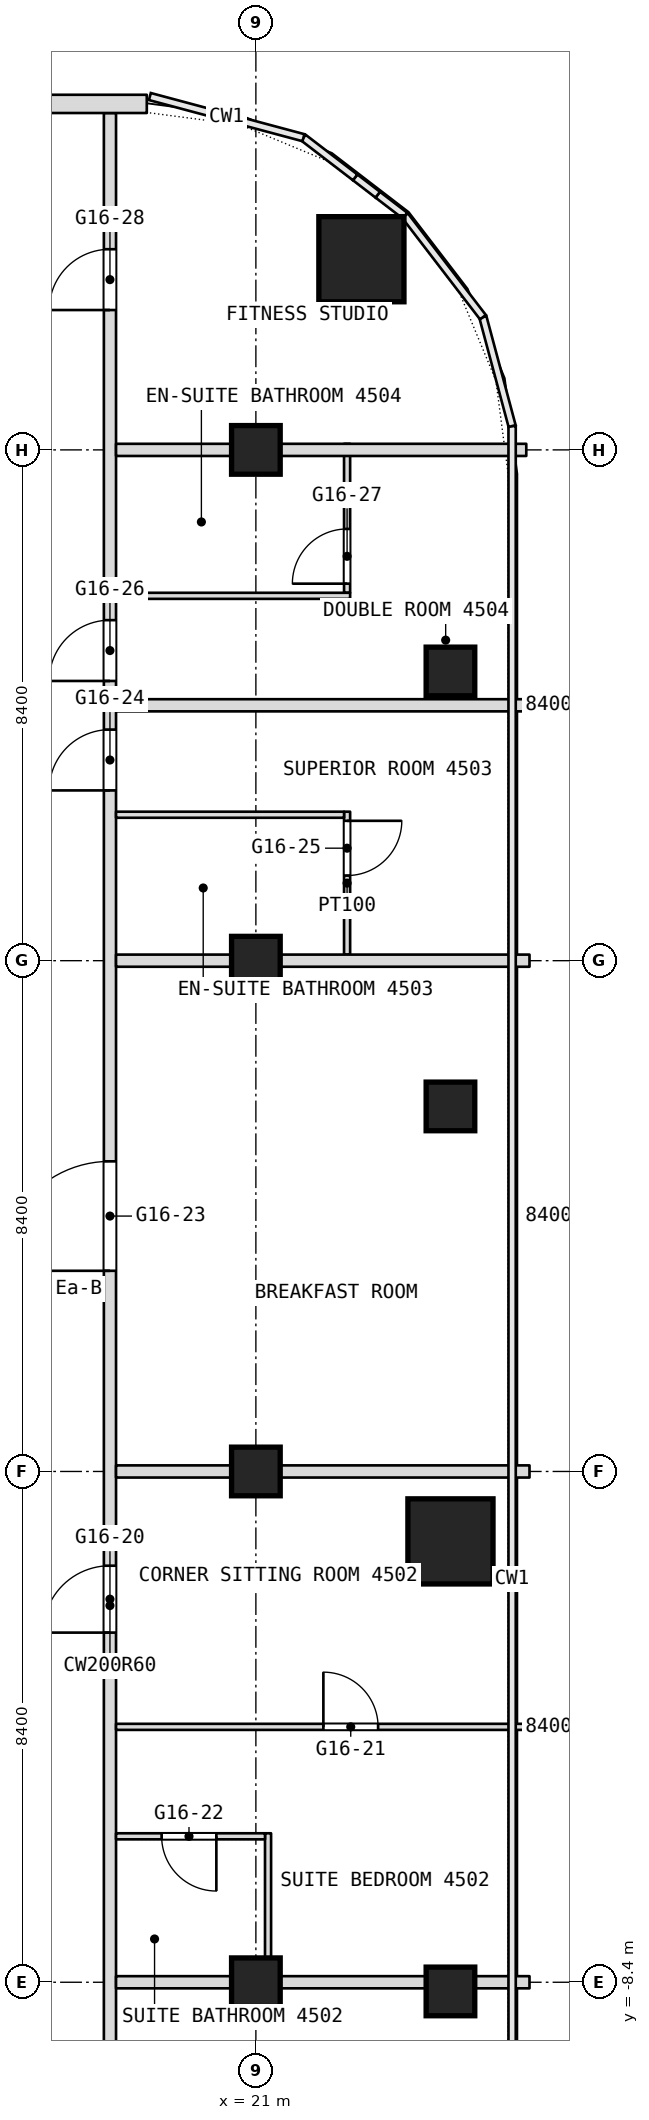
"""IFC4 building model, lengths in metres.
Left out: names, types, materials, properties, quantities, classifications, styles, units other than length and angle.
Written with IfcOpenShell. Run it as: python <this file> out.ifc"""

import sys

from ifc_helpers import new_model, si_unit, direction, frame, frame_2d, origin, origin_2d, place, context, subcontext, project, spatial, rectangle, extrude, element, fill, save


model = new_model("IFC4")
c1 = context("Model", 3, precision=1e-05, world=origin(), true_north=direction((0.0, 1.0)))
c2 = subcontext(c1, "Body", "Model", "MODEL_VIEW")
j1 = project(units=[si_unit("LENGTHUNIT", "METRE"), si_unit("PLANEANGLEUNIT", "RADIAN")], contexts=[c1])
p1 = place(None, origin())
s1 = spatial("IfcSite", under=j1, at=p1, CompositionType="ELEMENT")
p2 = place(p1, origin())
s2 = spatial("IfcBuilding", under=s1, at=p2, CompositionType="ELEMENT")
p3 = place(p2, frame((0.0, 0.0, 198.5)))
s3 = spatial("IfcBuildingStorey", under=s2, at=p3, CompositionType="ELEMENT", Elevation=198.5)
for number, where, z_axis, x_axis in (
    (1, (24.2, -1.15, 0.0), (0.0, 0.0, 1.0), (1.0, 0.0, 0.0)),
    (2, (22.736, 19.936, 0.0), (0.0, 0.0, 1.0), (1.0, 0.0, 0.0)),
):
    element("IfcColumn", number, at=place(p3, frame(where, z_axis=z_axis, x_axis=x_axis)), inside=s3, PredefinedType="COLUMN", context=c2, shape_type="SweptSolid", body=[
        extrude(rectangle(XDim=1.4, YDim=1.4, at=origin_2d()), origin(), (0.0, 0.0, 1.0), 3.6),
    ])
for number, where, z_axis, x_axis in (
    (3, (21.0, -8.4, 0.0), (0.0, 0.0, 1.0), (1.0, 0.0, 0.0)),
    (4, (21.0, 0.0, 0.0), (0.0, 0.0, 1.0), (1.0, 0.0, 0.0)),
    (5, (21.0, 8.4, 0.0), (0.0, 0.0, 1.0), (1.0, 0.0, 0.0)),
    (6, (21.0, 16.8, 0.0), (0.0, 0.0, 1.0), (1.0, 0.0, 0.0)),
    (7, (24.2, 13.156, 0.0), (0.0, 0.0, 1.0), (1.0, 0.0, 0.0)),
    (8, (24.2, 6.003, 0.0), (0.0, 0.0, 1.0), (1.0, 0.0, 0.0)),
    (9, (24.2, -8.551, 0.0), (0.0, 0.0, 1.0), (1.0, 0.0, 0.0)),
):
    element("IfcColumn", number, at=place(p3, frame(where, z_axis=z_axis, x_axis=x_axis)), inside=s3, PredefinedType="COLUMN", context=c2, shape_type="SweptSolid", body=[
        extrude(rectangle(XDim=0.8, YDim=0.8, at=origin_2d()), origin(), (0.0, 0.0, 1.0), 3.6),
    ])
p4 = place(p3, frame((22.5, 8.5, 0.0), z_axis=(0.0, 0.0, 1.0), x_axis=(0.0, 1.0, 0.0)))
e10 = element("IfcWall", 10, at=p4, inside=s3, PredefinedType="PARTITIONING", context=c2, shape_type="SweptSolid", body=[
    extrude(rectangle(XDim=2.35, YDim=0.1, at=frame_2d((1.175, 0.0))), origin(), (0.0, 0.0, 1.0), 3.34),
])
p5 = place(p4, frame((1.3, 0.0, 0.0)))
e11 = element("IfcOpeningElement", 11, at=p5, cuts=e10, PredefinedType="OPENING", context=c2, shape_type="SweptSolid", body=[
    extrude(rectangle(XDim=0.9, YDim=2.1, at=frame_2d((0.45, 1.05))), frame((0.0, 0.05, 0.0), z_axis=(0.0, -1.0, 0.0), x_axis=(1.0, 0.0, 0.0)), (0.0, 0.0, 1.0), 0.1),
])
p6 = place(p3, frame((22.5, 14.45, 0.0), z_axis=(0.0, 0.0, 1.0), x_axis=(0.0, 1.0, 0.0)))
e12 = element("IfcWall", 12, at=p6, inside=s3, PredefinedType="PARTITIONING", context=c2, shape_type="SweptSolid", body=[
    extrude(rectangle(XDim=2.45, YDim=0.1, at=frame_2d((1.225, 0.0))), origin(), (0.0, 0.0, 1.0), 3.34),
])
p7 = place(p6, frame((0.15, 0.0, 0.0)))
e13 = element("IfcOpeningElement", 13, at=p7, cuts=e12, PredefinedType="OPENING", context=c2, shape_type="SweptSolid", body=[
    extrude(rectangle(XDim=0.9, YDim=2.1, at=frame_2d((0.45, 1.05))), frame((0.0, 0.05, 0.0), z_axis=(0.0, -1.0, 0.0), x_axis=(1.0, 0.0, 0.0)), (0.0, 0.0, 1.0), 0.1),
])
p8 = place(p3, frame((21.2, -8.3, 0.0), z_axis=(0.0, 0.0, 1.0), x_axis=(0.0, 1.0, 0.0)))
e14 = element("IfcWall", 14, at=p8, inside=s3, PredefinedType="PARTITIONING", context=c2, shape_type="SweptSolid", body=[
    extrude(rectangle(XDim=2.35, YDim=0.1, at=frame_2d((1.175, 0.0))), origin(), (0.0, 0.0, 1.0), 3.34),
])
p9 = place(p3, frame((18.6, -26.751, 0.0), z_axis=(0.0, 0.0, 1.0), x_axis=(0.0, 1.0, 0.0)))
e15 = element("IfcWall", 15, at=p9, inside=s3, PredefinedType="PARTITIONING", context=c2, shape_type="SweptSolid", body=[
    extrude(rectangle(XDim=49.091, YDim=0.2, at=frame_2d((24.545, 0.0))), origin(), (0.0, 0.0, 1.0), 3.34),
])
p10 = place(p9, frame((4.576, 0.0, 0.0)))
e16 = element("IfcOpeningElement", 16, at=p10, cuts=e15, PredefinedType="OPENING", context=c2, shape_type="SweptSolid", body=[
    extrude(rectangle(XDim=1.1, YDim=2.1, at=frame_2d((0.55, 1.05))), frame((0.0, 0.1, 0.0), z_axis=(0.0, -1.0, 0.0), x_axis=(1.0, 0.0, 0.0)), (0.0, 0.0, 1.0), 0.2),
])
p11 = place(p9, frame((13.251, 0.0, 0.0)))
e17 = element("IfcOpeningElement", 17, at=p11, cuts=e15, PredefinedType="OPENING", context=c2, shape_type="SweptSolid", body=[
    extrude(rectangle(XDim=1.8, YDim=2.1, at=frame_2d((0.9, 1.05))), frame((0.0, 0.1, 0.0), z_axis=(0.0, -1.0, 0.0), x_axis=(1.0, 0.0, 0.0)), (0.0, 0.0, 1.0), 0.2),
])
p12 = place(p9, frame((24.101, 0.0, 0.0)))
e18 = element("IfcOpeningElement", 18, at=p12, cuts=e15, PredefinedType="OPENING", context=c2, shape_type="SweptSolid", body=[
    extrude(rectangle(XDim=1.1, YDim=2.1, at=frame_2d((0.55, 1.05))), frame((0.0, 0.1, 0.0), z_axis=(0.0, -1.0, 0.0), x_axis=(1.0, 0.0, 0.0)), (0.0, 0.0, 1.0), 0.2),
])
p13 = place(p9, frame((30.051, 0.0, 0.0)))
e19 = element("IfcOpeningElement", 19, at=p13, cuts=e15, PredefinedType="OPENING", context=c2, shape_type="SweptSolid", body=[
    extrude(rectangle(XDim=1.8, YDim=2.1, at=frame_2d((0.9, 1.05))), frame((0.0, 0.1, 0.0), z_axis=(0.0, -1.0, 0.0), x_axis=(1.0, 0.0, 0.0)), (0.0, 0.0, 1.0), 0.2),
])
p14 = place(p9, frame((37.951, 0.0, 0.0)))
e20 = element("IfcOpeningElement", 20, at=p14, cuts=e15, PredefinedType="OPENING", context=c2, shape_type="SweptSolid", body=[
    extrude(rectangle(XDim=1.0, YDim=2.1, at=frame_2d((0.5, 1.05))), frame((0.0, 0.1, 0.0), z_axis=(0.0, -1.0, 0.0), x_axis=(1.0, 0.0, 0.0)), (0.0, 0.0, 1.0), 0.2),
])
p15 = place(p9, frame((39.751, 0.0, 0.0)))
e21 = element("IfcOpeningElement", 21, at=p15, cuts=e15, PredefinedType="OPENING", context=c2, shape_type="SweptSolid", body=[
    extrude(rectangle(XDim=1.0, YDim=2.1, at=frame_2d((0.5, 1.05))), frame((0.0, 0.1, 0.0), z_axis=(0.0, -1.0, 0.0), x_axis=(1.0, 0.0, 0.0)), (0.0, 0.0, 1.0), 0.2),
])
p16 = place(p9, frame((45.851, 0.0, 0.0)))
e22 = element("IfcOpeningElement", 22, at=p16, cuts=e15, PredefinedType="OPENING", context=c2, shape_type="SweptSolid", body=[
    extrude(rectangle(XDim=1.0, YDim=2.1, at=frame_2d((0.5, 1.05))), frame((0.0, 0.1, 0.0), z_axis=(0.0, -1.0, 0.0), x_axis=(1.0, 0.0, 0.0)), (0.0, 0.0, 1.0), 0.2),
])
p17 = place(p3, frame((18.7, -8.4, 0.0), z_axis=(0.0, 0.0, 1.0), x_axis=(1.0, 0.0, 0.0)))
e23 = element("IfcWall", 23, at=p17, inside=s3, PredefinedType="PARTITIONING", context=c2, shape_type="SweptSolid", body=[
    extrude(rectangle(XDim=6.8, YDim=0.2, at=frame_2d((3.4, 0.0))), origin(), (0.0, 0.0, 1.0), 2.94),
])
p18 = place(p3, frame((18.7, -6.0, 0.0), z_axis=(0.0, 0.0, 1.0), x_axis=(1.0, 0.0, 0.0)))
e24 = element("IfcWall", 24, at=p18, inside=s3, PredefinedType="PARTITIONING", context=c2, shape_type="SweptSolid", body=[
    extrude(rectangle(XDim=2.45, YDim=0.1, at=frame_2d((1.225, 0.0))), origin(), (0.0, 0.0, 1.0), 3.34),
])
p19 = place(p18, frame((0.75, 0.0, 0.0)))
e25 = element("IfcOpeningElement", 25, at=p19, cuts=e24, PredefinedType="OPENING", context=c2, shape_type="SweptSolid", body=[
    extrude(rectangle(XDim=0.9, YDim=2.1, at=frame_2d((0.45, 1.05))), frame((0.0, 0.05, 0.0), z_axis=(0.0, -1.0, 0.0), x_axis=(1.0, 0.0, 0.0)), (0.0, 0.0, 1.0), 0.1),
])
p20 = place(p3, frame((18.7, -4.2, 0.0), z_axis=(0.0, 0.0, 1.0), x_axis=(1.0, 0.0, 0.0)))
e26 = element("IfcWall", 26, at=p20, inside=s3, PredefinedType="PARTITIONING", context=c2, shape_type="SweptSolid", body=[
    extrude(rectangle(XDim=6.8, YDim=0.1, at=frame_2d((3.4, 0.0))), origin(), (0.0, 0.0, 1.0), 3.34),
])
p21 = place(p20, frame((3.41, 0.0, 0.0)))
e27 = element("IfcOpeningElement", 27, at=p21, cuts=e26, PredefinedType="OPENING", context=c2, shape_type="SweptSolid", body=[
    extrude(rectangle(XDim=0.9, YDim=2.1, at=frame_2d((0.45, 1.05))), frame((0.0, 0.05, 0.0), z_axis=(0.0, -1.0, 0.0), x_axis=(1.0, 0.0, 0.0)), (0.0, 0.0, 1.0), 0.1),
])
for number, where, z_axis, x_axis in (
    (28, (18.7, 0.0, 0.0), (0.0, 0.0, 1.0), (1.0, 0.0, 0.0)),
    (29, (18.7, 8.4, 0.0), (0.0, 0.0, 1.0), (1.0, 0.0, 0.0)),
):
    element("IfcWall", number, at=place(p3, frame(where, z_axis=z_axis, x_axis=x_axis)), inside=s3, PredefinedType="PARTITIONING", context=c2, shape_type="SweptSolid", body=[
        extrude(rectangle(XDim=6.8, YDim=0.2, at=frame_2d((3.4, 0.0))), origin(), (0.0, 0.0, 1.0), 2.94),
    ])
p22 = place(p3, frame((18.7, 10.8, 0.0), z_axis=(0.0, 0.0, 1.0), x_axis=(1.0, 0.0, 0.0)))
e30 = element("IfcWall", 30, at=p22, inside=s3, PredefinedType="PARTITIONING", context=c2, shape_type="SweptSolid", body=[
    extrude(rectangle(XDim=3.75, YDim=0.1, at=frame_2d((1.875, 0.0))), origin(), (0.0, 0.0, 1.0), 3.34),
])
p23 = place(p3, frame((18.7, 12.6, 0.0), z_axis=(0.0, 0.0, 1.0), x_axis=(1.0, 0.0, 0.0)))
e31 = element("IfcWall", 31, at=p23, inside=s3, PredefinedType="PARTITIONING", context=c2, shape_type="SweptSolid", body=[
    extrude(rectangle(XDim=6.8, YDim=0.2, at=frame_2d((3.4, 0.0))), origin(), (0.0, 0.0, 1.0), 3.34),
])
p24 = place(p3, frame((18.7, 14.4, 0.0), z_axis=(0.0, 0.0, 1.0), x_axis=(1.0, 0.0, 0.0)))
e32 = element("IfcWall", 32, at=p24, inside=s3, PredefinedType="PARTITIONING", context=c2, shape_type="SweptSolid", body=[
    extrude(rectangle(XDim=3.85, YDim=0.1, at=frame_2d((1.925, 0.0))), origin(), (0.0, 0.0, 1.0), 3.34),
])
p25 = place(p3, frame((18.7, 16.8, 0.0), z_axis=(0.0, 0.0, 1.0), x_axis=(1.0, 0.0, 0.0)))
e33 = element("IfcWall", 33, at=p25, inside=s3, PredefinedType="PARTITIONING", context=c2, shape_type="SweptSolid", body=[
    extrude(rectangle(XDim=6.747, YDim=0.2, at=frame_2d((3.374, 0.0))), origin(), (0.0, 0.0, 1.0), 2.94),
])
p26 = place(p3, frame((19.206, 22.49, 0.0), z_axis=(0.0, 0.0, 1.0), x_axis=(-1.0, 0.0, 0.0)))
e34 = element("IfcWall", 34, at=p26, inside=s3, PredefinedType="NOTDEFINED", context=c2, shape_type="SweptSolid", body=[
    extrude(rectangle(XDim=38.412, YDim=0.3, at=frame_2d((19.206, 0.0))), origin(), (0.0, 0.0, 1.0), 3.6),
])
p27 = place(p26, frame((3.306, 0.0, 0.9)))
e35 = element("IfcOpeningElement", 35, at=p27, cuts=e34, PredefinedType="OPENING", context=c2, shape_type="SweptSolid", body=[
    extrude(rectangle(XDim=2.4, YDim=2.1, at=frame_2d((1.2, 1.05))), frame((0.0, 0.15, 0.0), z_axis=(0.0, -1.0, 0.0), x_axis=(1.0, 0.0, 0.0)), (0.0, 0.0, 1.0), 0.3),
])
p28 = place(p26, frame((7.506, 0.0, 0.9)))
e36 = element("IfcOpeningElement", 36, at=p28, cuts=e34, PredefinedType="OPENING", context=c2, shape_type="SweptSolid", body=[
    extrude(rectangle(XDim=2.4, YDim=2.1, at=frame_2d((1.2, 1.05))), frame((0.0, 0.15, 0.0), z_axis=(0.0, -1.0, 0.0), x_axis=(1.0, 0.0, 0.0)), (0.0, 0.0, 1.0), 0.3),
])
p29 = place(p26, frame((11.706, 0.0, 0.9)))
e37 = element("IfcOpeningElement", 37, at=p29, cuts=e34, PredefinedType="OPENING", context=c2, shape_type="SweptSolid", body=[
    extrude(rectangle(XDim=2.4, YDim=2.1, at=frame_2d((1.2, 1.05))), frame((0.0, 0.15, 0.0), z_axis=(0.0, -1.0, 0.0), x_axis=(1.0, 0.0, 0.0)), (0.0, 0.0, 1.0), 0.3),
])
p30 = place(p26, frame((15.906, 0.0, 0.9)))
e38 = element("IfcOpeningElement", 38, at=p30, cuts=e34, PredefinedType="OPENING", context=c2, shape_type="SweptSolid", body=[
    extrude(rectangle(XDim=2.4, YDim=2.1, at=frame_2d((1.2, 1.05))), frame((0.0, 0.15, 0.0), z_axis=(0.0, -1.0, 0.0), x_axis=(1.0, 0.0, 0.0)), (0.0, 0.0, 1.0), 0.3),
])
p31 = place(p26, frame((20.106, 0.0, 0.9)))
e39 = element("IfcOpeningElement", 39, at=p31, cuts=e34, PredefinedType="OPENING", context=c2, shape_type="SweptSolid", body=[
    extrude(rectangle(XDim=2.4, YDim=2.1, at=frame_2d((1.2, 1.05))), frame((0.0, 0.15, 0.0), z_axis=(0.0, -1.0, 0.0), x_axis=(1.0, 0.0, 0.0)), (0.0, 0.0, 1.0), 0.3),
])
p32 = place(p26, frame((24.306, 0.0, 0.9)))
e40 = element("IfcOpeningElement", 40, at=p32, cuts=e34, PredefinedType="OPENING", context=c2, shape_type="SweptSolid", body=[
    extrude(rectangle(XDim=2.4, YDim=2.1, at=frame_2d((1.2, 1.05))), frame((0.0, 0.15, 0.0), z_axis=(0.0, -1.0, 0.0), x_axis=(1.0, 0.0, 0.0)), (0.0, 0.0, 1.0), 0.3),
])
p33 = place(p26, frame((28.506, 0.0, 0.9)))
e41 = element("IfcOpeningElement", 41, at=p33, cuts=e34, PredefinedType="OPENING", context=c2, shape_type="SweptSolid", body=[
    extrude(rectangle(XDim=2.4, YDim=2.1, at=frame_2d((1.2, 1.05))), frame((0.0, 0.15, 0.0), z_axis=(0.0, -1.0, 0.0), x_axis=(1.0, 0.0, 0.0)), (0.0, 0.0, 1.0), 0.3),
])
p34 = place(p26, frame((32.706, 0.0, 0.9)))
e42 = element("IfcOpeningElement", 42, at=p34, cuts=e34, PredefinedType="OPENING", context=c2, shape_type="SweptSolid", body=[
    extrude(rectangle(XDim=2.4, YDim=2.1, at=frame_2d((1.2, 1.05))), frame((0.0, 0.15, 0.0), z_axis=(0.0, -1.0, 0.0), x_axis=(1.0, 0.0, 0.0)), (0.0, 0.0, 1.0), 0.3),
])
p35 = place(p5, origin())
e43 = element("IfcDoor", 43, at=p35, inside=s3, OperationType="SINGLE_SWING_RIGHT", PredefinedType="DOOR", context=c2, shape_type="SweptSolid", body=[
    extrude(rectangle(XDim=0.9, YDim=2.1, at=frame_2d((0.45, 1.05))), frame((0.0, 0.025, 0.0), z_axis=(0.0, -1.0, 0.0), x_axis=(1.0, 0.0, 0.0)), (0.0, 0.0, 1.0), 0.05),
])
fill(e11, e43)
p36 = place(p7, origin())
e44 = element("IfcDoor", 44, at=p36, inside=s3, OperationType="SINGLE_SWING_LEFT", PredefinedType="DOOR", context=c2, shape_type="SweptSolid", body=[
    extrude(rectangle(XDim=0.9, YDim=2.1, at=frame_2d((0.45, 1.05))), frame((0.0, 0.025, 0.0), z_axis=(0.0, -1.0, 0.0), x_axis=(1.0, 0.0, 0.0)), (0.0, 0.0, 1.0), 0.05),
])
fill(e13, e44)
p37 = place(p12, origin())
e45 = element("IfcDoor", 45, at=p37, inside=s3, OperationType="SINGLE_SWING_RIGHT", PredefinedType="DOOR", context=c2, shape_type="SweptSolid", body=[
    extrude(rectangle(XDim=1.1, YDim=2.1, at=frame_2d((0.55, 1.05))), frame((0.0, 0.025, 0.0), z_axis=(0.0, -1.0, 0.0), x_axis=(1.0, 0.0, 0.0)), (0.0, 0.0, 1.0), 0.05),
])
fill(e18, e45)
p38 = place(p13, origin())
e46 = element("IfcDoor", 46, at=p38, inside=s3, OperationType="DOUBLE_DOOR_SINGLE_SWING", PredefinedType="DOOR", context=c2, shape_type="SweptSolid", body=[
    extrude(rectangle(XDim=1.8, YDim=2.1, at=frame_2d((0.9, 1.05))), frame((0.0, 0.025, 0.0), z_axis=(0.0, -1.0, 0.0), x_axis=(1.0, 0.0, 0.0)), (0.0, 0.0, 1.0), 0.05),
])
fill(e19, e46)
p39 = place(p14, origin())
e47 = element("IfcDoor", 47, at=p39, inside=s3, OperationType="SINGLE_SWING_RIGHT", PredefinedType="DOOR", context=c2, shape_type="SweptSolid", body=[
    extrude(rectangle(XDim=1.0, YDim=2.1, at=frame_2d((0.5, 1.05))), frame((0.0, 0.025, 0.0), z_axis=(0.0, -1.0, 0.0), x_axis=(1.0, 0.0, 0.0)), (0.0, 0.0, 1.0), 0.05),
])
fill(e20, e47)
p40 = place(p15, origin())
e48 = element("IfcDoor", 48, at=p40, inside=s3, OperationType="SINGLE_SWING_RIGHT", PredefinedType="DOOR", context=c2, shape_type="SweptSolid", body=[
    extrude(rectangle(XDim=1.0, YDim=2.1, at=frame_2d((0.5, 1.05))), frame((0.0, 0.025, 0.0), z_axis=(0.0, -1.0, 0.0), x_axis=(1.0, 0.0, 0.0)), (0.0, 0.0, 1.0), 0.05),
])
fill(e21, e48)
p41 = place(p16, origin())
e49 = element("IfcDoor", 49, at=p41, inside=s3, OperationType="SINGLE_SWING_LEFT", PredefinedType="DOOR", context=c2, shape_type="SweptSolid", body=[
    extrude(rectangle(XDim=1.0, YDim=2.1, at=frame_2d((0.5, 1.05))), frame((0.0, 0.025, 0.0), z_axis=(0.0, -1.0, 0.0), x_axis=(1.0, 0.0, 0.0)), (0.0, 0.0, 1.0), 0.05),
])
fill(e22, e49)
p42 = place(p19, origin())
e50 = element("IfcDoor", 50, at=p42, inside=s3, OperationType="SINGLE_SWING_RIGHT", PredefinedType="DOOR", context=c2, shape_type="SweptSolid", body=[
    extrude(rectangle(XDim=0.9, YDim=2.1, at=frame_2d((0.45, 1.05))), frame((0.0, 0.025, 0.0), z_axis=(0.0, -1.0, 0.0), x_axis=(1.0, 0.0, 0.0)), (0.0, 0.0, 1.0), 0.05),
])
fill(e25, e50)
p43 = place(p21, origin())
e51 = element("IfcDoor", 51, at=p43, inside=s3, OperationType="SINGLE_SWING_RIGHT", PredefinedType="DOOR", context=c2, shape_type="SweptSolid", body=[
    extrude(rectangle(XDim=0.9, YDim=2.1, at=frame_2d((0.45, 1.05))), frame((0.0, 0.025, 0.0), z_axis=(0.0, -1.0, 0.0), x_axis=(1.0, 0.0, 0.0)), (0.0, 0.0, 1.0), 0.05),
])
fill(e27, e51)
save(model, sys.argv[1])
